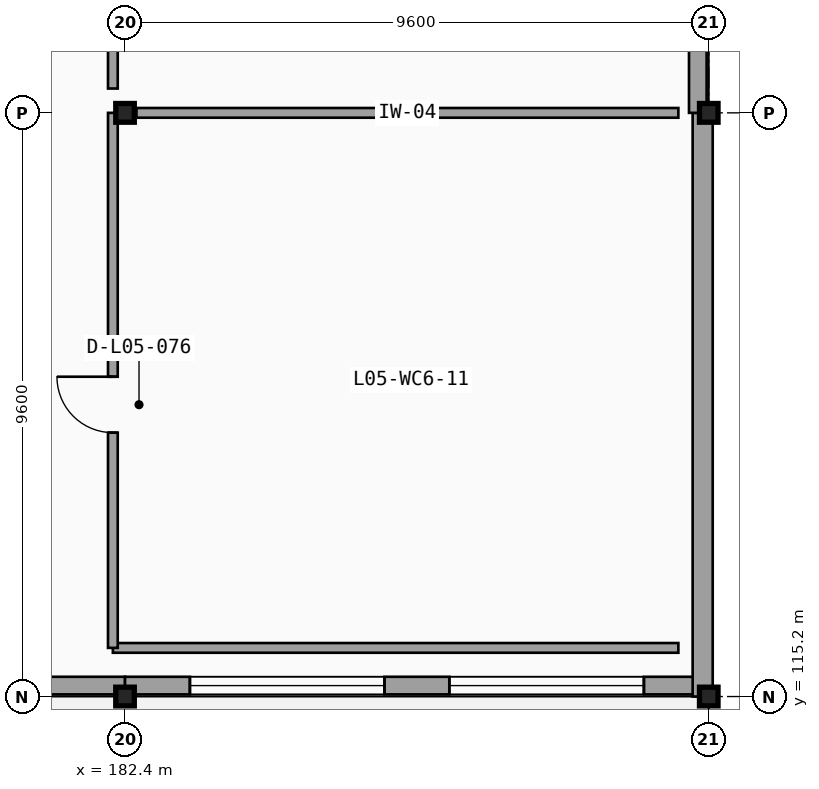
"""IFC4 building model, lengths in metres.
Left out: names, types, materials, properties, quantities, classifications, styles, units other than length and angle.
Written with IfcOpenShell. Run it as: python <this file> out.ifc"""

import sys

from ifc_helpers import new_model, si_unit, direction, frame, frame_2d, origin, origin_2d, place, context, subcontext, project, spatial, rectangle, i_section, extrude, element, fill, save


model = new_model("IFC4")
c1 = context("Model", 3, precision=1e-05, world=origin(), true_north=direction((0.0, 1.0)))
c2 = subcontext(c1, "Body", "Model", "MODEL_VIEW")
j1 = project(units=[si_unit("LENGTHUNIT", "METRE"), si_unit("PLANEANGLEUNIT", "RADIAN")], contexts=[c1])
p1 = place(None, origin())
s1 = spatial("IfcSite", under=j1, at=p1, CompositionType="ELEMENT")
p2 = place(p1, origin())
s2 = spatial("IfcBuilding", under=s1, at=p2, CompositionType="ELEMENT")
p3 = place(p2, frame((0.0, 0.0, 23.1)))
s3 = spatial("IfcBuildingStorey", under=s2, at=p3, CompositionType="ELEMENT", Elevation=23.1)
for number, where, z_axis, x_axis in (
    (1, (182.4, 115.2, 0.0), (0.0, 0.0, 1.0), (1.0, 0.0, 0.0)),
    (2, (182.4, 124.8, 0.0), (0.0, 0.0, 1.0), (1.0, 0.0, 0.0)),
    (3, (192.0, 115.2, 0.0), (0.0, 0.0, 1.0), (1.0, 0.0, 0.0)),
    (4, (192.0, 124.8, 0.0), (0.0, 0.0, 1.0), (1.0, 0.0, 0.0)),
):
    element("IfcColumn", number, at=place(p3, frame(where, z_axis=z_axis, x_axis=x_axis)), inside=s3, PredefinedType="COLUMN", context=c2, shape_type="SweptSolid", body=[
        extrude(i_section(OverallWidth=0.305, OverallDepth=0.308, WebThickness=0.01, FlangeThickness=0.015, FilletRadius=0.013, at=origin_2d()), origin(), (0.0, 0.0, 1.0), 5.1),
    ])
p4 = place(p3, frame((172.8, 115.38, 0.0), z_axis=(0.0, 0.0, 1.0), x_axis=(1.0, 0.0, 0.0)))
e5 = element("IfcWall", 5, at=p4, inside=s3, PredefinedType="SOLIDWALL", context=c2, shape_type="SweptSolid", body=[
    extrude(rectangle(XDim=9.6, YDim=0.29, at=frame_2d((4.8, 0.0))), origin(), (0.0, 0.0, 1.0), 3.893),
])
p5 = place(p4, frame((5.6, 0.0, 0.0), z_axis=(0.0, 0.0, 1.0), x_axis=(-1.0, 0.0, 0.0)))
e6 = element("IfcOpeningElement", 6, at=p5, cuts=e5, PredefinedType="OPENING", context=c2, shape_type="SweptSolid", body=[
    extrude(rectangle(XDim=1.6, YDim=2.25, at=frame_2d((0.8, 1.125))), frame((0.0, 0.155, 0.0), z_axis=(0.0, -1.0, 0.0), x_axis=(1.0, 0.0, 0.0)), (0.0, 0.0, 1.0), 0.31),
])
p6 = place(p3, frame((182.4, 115.38, 0.0), z_axis=(0.0, 0.0, 1.0), x_axis=(1.0, 0.0, 0.0)))
e7 = element("IfcWall", 7, at=p6, inside=s3, PredefinedType="SOLIDWALL", context=c2, shape_type="SweptSolid", body=[
    extrude(rectangle(XDim=9.6, YDim=0.29, at=frame_2d((4.8, 0.0))), origin(), (0.0, 0.0, 1.0), 3.893),
])
p7 = place(p6, frame((4.267, 0.0, 0.95), z_axis=(0.0, 0.0, 1.0), x_axis=(-1.0, 0.0, 0.0)))
e8 = element("IfcOpeningElement", 8, at=p7, cuts=e7, PredefinedType="OPENING", context=c2, shape_type="SweptSolid", body=[
    extrude(rectangle(XDim=3.2, YDim=2.2, at=frame_2d((1.6, 1.1))), frame((0.0, 0.155, 0.0), z_axis=(0.0, -1.0, 0.0), x_axis=(1.0, 0.0, 0.0)), (0.0, 0.0, 1.0), 0.31),
])
p8 = place(p6, frame((8.533, 0.0, 0.95), z_axis=(0.0, 0.0, 1.0), x_axis=(-1.0, 0.0, 0.0)))
e9 = element("IfcOpeningElement", 9, at=p8, cuts=e7, PredefinedType="OPENING", context=c2, shape_type="SweptSolid", body=[
    extrude(rectangle(XDim=3.2, YDim=2.2, at=frame_2d((1.6, 1.1))), frame((0.0, 0.155, 0.0), z_axis=(0.0, -1.0, 0.0), x_axis=(1.0, 0.0, 0.0)), (0.0, 0.0, 1.0), 0.31),
])
p9 = place(p3, frame((191.9, 115.2, 0.0), z_axis=(0.0, 0.0, 1.0), x_axis=(0.0, 1.0, 0.0)))
e10 = element("IfcWall", 10, at=p9, inside=s3, PredefinedType="SOLIDWALL", context=c2, shape_type="SweptSolid", body=[
    extrude(rectangle(XDim=9.6, YDim=0.33, at=frame_2d((4.8, 0.0))), origin(), (0.0, 0.0, 1.0), 3.893),
])
p10 = place(p3, frame((191.82, 124.8, 0.0), z_axis=(0.0, 0.0, 1.0), x_axis=(0.0, 1.0, 0.0)))
e11 = element("IfcWall", 11, at=p10, inside=s3, PredefinedType="SOLIDWALL", context=c2, shape_type="SweptSolid", body=[
    extrude(rectangle(XDim=9.6, YDim=0.29, at=frame_2d((4.8, 0.0))), origin(), (0.0, 0.0, 1.0), 3.906),
])
p11 = place(p10, frame((4.267, 0.0, 0.95), z_axis=(0.0, 0.0, 1.0), x_axis=(-1.0, 0.0, 0.0)))
e12 = element("IfcOpeningElement", 12, at=p11, cuts=e11, PredefinedType="OPENING", context=c2, shape_type="SweptSolid", body=[
    extrude(rectangle(XDim=3.2, YDim=2.2, at=frame_2d((1.6, 1.1))), frame((0.0, 0.155, 0.0), z_axis=(0.0, -1.0, 0.0), x_axis=(1.0, 0.0, 0.0)), (0.0, 0.0, 1.0), 0.31),
])
p12 = place(p10, frame((8.533, 0.0, 0.95), z_axis=(0.0, 0.0, 1.0), x_axis=(-1.0, 0.0, 0.0)))
e13 = element("IfcOpeningElement", 13, at=p12, cuts=e11, PredefinedType="OPENING", context=c2, shape_type="SweptSolid", body=[
    extrude(rectangle(XDim=3.2, YDim=2.2, at=frame_2d((1.6, 1.1))), frame((0.0, 0.155, 0.0), z_axis=(0.0, -1.0, 0.0), x_axis=(1.0, 0.0, 0.0)), (0.0, 0.0, 1.0), 0.31),
])
p13 = place(p3, frame((182.587, 124.8, 0.0), z_axis=(0.0, 0.0, 1.0), x_axis=(1.0, 0.0, 0.0)))
e14 = element("IfcWall", 14, at=p13, inside=s3, PredefinedType="PARTITIONING", context=c2, shape_type="SweptSolid", body=[
    extrude(rectangle(XDim=8.913, YDim=0.16, at=frame_2d((4.456, 0.0))), origin(), (0.0, 0.0, 1.0), 3.906),
])
p14 = place(p3, frame((191.5, 116.0, 0.0), z_axis=(0.0, 0.0, 1.0), x_axis=(-1.0, 0.0, 0.0)))
e15 = element("IfcWall", 15, at=p14, inside=s3, PredefinedType="PARTITIONING", context=c2, shape_type="SweptSolid", body=[
    extrude(rectangle(XDim=9.3, YDim=0.16, at=frame_2d((4.65, 0.0))), origin(), (0.0, 0.0, 1.0), 3.906),
])
p15 = place(p3, frame((182.2, 116.0, 0.0), z_axis=(0.0, 0.0, 1.0), x_axis=(0.0, 1.0, 0.0)))
e16 = element("IfcWall", 16, at=p15, inside=s3, PredefinedType="PARTITIONING", context=c2, shape_type="SweptSolid", body=[
    extrude(rectangle(XDim=8.8, YDim=0.16, at=frame_2d((4.4, 0.0))), origin(), (0.0, 0.0, 1.0), 3.906),
])
p16 = place(p15, frame((3.54, 0.0, 0.0), z_axis=(0.0, 0.0, 1.0), x_axis=(1.0, 0.0, 0.0)))
e17 = element("IfcOpeningElement", 17, at=p16, cuts=e16, PredefinedType="OPENING", context=c2, shape_type="SweptSolid", body=[
    extrude(rectangle(XDim=0.92, YDim=2.12, at=frame_2d((0.46, 1.06))), frame((0.0, 0.09, 0.0), z_axis=(0.0, -1.0, 0.0), x_axis=(1.0, 0.0, 0.0)), (0.0, 0.0, 1.0), 0.18),
])
p17 = place(p3, frame((182.2, 125.2, 0.0), z_axis=(0.0, 0.0, 1.0), x_axis=(0.0, 1.0, 0.0)))
e18 = element("IfcWall", 18, at=p17, inside=s3, PredefinedType="PARTITIONING", context=c2, shape_type="SweptSolid", body=[
    extrude(rectangle(XDim=8.6, YDim=0.16, at=frame_2d((4.3, 0.0))), origin(), (0.0, 0.0, 1.0), 3.906),
])
p18 = place(p17, frame((3.89, 0.0, 0.0), z_axis=(0.0, 0.0, 1.0), x_axis=(1.0, 0.0, 0.0)))
e19 = element("IfcOpeningElement", 19, at=p18, cuts=e18, PredefinedType="OPENING", context=c2, shape_type="SweptSolid", body=[
    extrude(rectangle(XDim=1.02, YDim=2.15, at=frame_2d((0.51, 1.075))), frame((0.0, 0.09, 0.0), z_axis=(0.0, -1.0, 0.0), x_axis=(1.0, 0.0, 0.0)), (0.0, 0.0, 1.0), 0.18),
])
p19 = place(p7, origin())
e20 = element("IfcWindow", 20, at=p19, inside=s3, PartitioningType="SINGLE_PANEL", PredefinedType="WINDOW", context=c2, shape_type="SweptSolid", body=[
    extrude(rectangle(XDim=3.2, YDim=2.2, at=frame_2d((1.6, 1.1))), frame((0.0, 0.03, 0.0), z_axis=(0.0, -1.0, 0.0), x_axis=(1.0, 0.0, 0.0)), (0.0, 0.0, 1.0), 0.06),
])
fill(e8, e20)
p20 = place(p8, origin())
e21 = element("IfcWindow", 21, at=p20, inside=s3, PartitioningType="SINGLE_PANEL", PredefinedType="WINDOW", context=c2, shape_type="SweptSolid", body=[
    extrude(rectangle(XDim=3.2, YDim=2.2, at=frame_2d((1.6, 1.1))), frame((0.0, 0.03, 0.0), z_axis=(0.0, -1.0, 0.0), x_axis=(1.0, 0.0, 0.0)), (0.0, 0.0, 1.0), 0.06),
])
fill(e9, e21)
p21 = place(p16, origin())
e22 = element("IfcDoor", 22, at=p21, inside=s3, OperationType="SINGLE_SWING_RIGHT", PredefinedType="DOOR", context=c2, shape_type="SweptSolid", body=[
    extrude(rectangle(XDim=0.92, YDim=2.12, at=frame_2d((0.46, 1.06))), frame((0.0, 0.025, 0.0), z_axis=(0.0, -1.0, 0.0), x_axis=(1.0, 0.0, 0.0)), (0.0, 0.0, 1.0), 0.05),
])
fill(e17, e22)
save(model, sys.argv[1])
